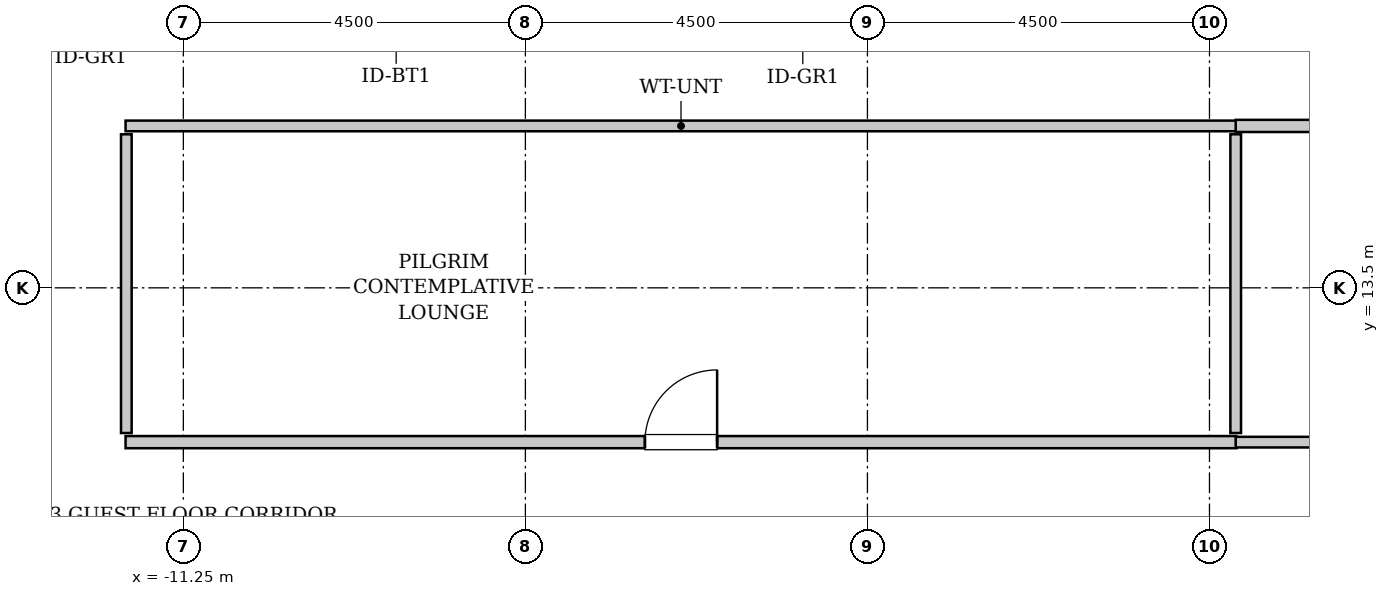
"""IFC4 building model, lengths in metres.
Left out: names, types, materials, properties, quantities, classifications, styles, units other than length and angle.
Written with IfcOpenShell. Run it as: python <this file> out.ifc"""

import sys

from ifc_helpers import new_model, si_unit, direction, frame, frame_2d, origin, place, context, subcontext, project, spatial, rectangle, extrude, source, transform, mapped, element, fill, save


model = new_model("IFC4")
c1 = context("Model", 3, precision=1e-05, world=origin(), true_north=direction((0.0, 1.0)))
c2 = subcontext(c1, "Body", "Model", "MODEL_VIEW")
j1 = project(units=[si_unit("LENGTHUNIT", "METRE"), si_unit("PLANEANGLEUNIT", "RADIAN")], contexts=[c1])
p1 = place(None, origin())
s1 = spatial("IfcSite", under=j1, at=p1, CompositionType="ELEMENT")
p2 = place(p1, origin())
s2 = spatial("IfcBuilding", under=s1, at=p2, CompositionType="ELEMENT")
p3 = place(p2, frame((0.0, 0.0, 214.2)))
s3 = spatial("IfcBuildingStorey", under=s2, at=p3, CompositionType="ELEMENT", Elevation=214.2)
m1 = source(origin(), c2, "Body", "SweptSolid", [
    extrude(rectangle(XDim=14.615, YDim=0.16, at=frame_2d((7.308, 0.0))), origin(), (0.0, 0.0, 1.0), 3.535),
])
p4 = place(p3, frame((-12.01, 11.47, 0.0), z_axis=(0.0, 0.0, 1.0), x_axis=(1.0, 0.0, 0.0)))
e1 = element("IfcWall", 1, at=p4, inside=s3, PredefinedType="PARTITIONING", context=c2, shape_type="MappedRepresentation", body=[
    mapped(m1, transform((0.0, 0.0, 0.0), x_axis=(1.0, 0.0, 0.0), y_axis=(0.0, 1.0, 0.0), z_axis=(0.0, 0.0, 1.0), scale=1.0)),
])
p5 = place(p4, frame((6.833, 0.0, 0.0)))
e2 = element("IfcOpeningElement", 2, at=p5, cuts=e1, PredefinedType="OPENING", context=c2, shape_type="SweptSolid", body=[
    extrude(rectangle(XDim=0.95, YDim=2.1, at=frame_2d((0.475, 1.05))), frame((0.0, 0.09, 0.0), z_axis=(0.0, -1.0, 0.0), x_axis=(1.0, 0.0, 0.0)), (0.0, 0.0, 1.0), 0.18),
])
m2 = source(origin(), c2, "Body", "SweptSolid", [
    extrude(rectangle(XDim=14.615, YDim=0.14, at=frame_2d((7.308, 0.0))), origin(), (0.0, 0.0, 1.0), 3.535),
])
p6 = place(p3, frame((-12.01, 15.63, 0.0), z_axis=(0.0, 0.0, 1.0), x_axis=(1.0, 0.0, 0.0)))
e3 = element("IfcWall", 3, at=p6, inside=s3, PredefinedType="PARTITIONING", context=c2, shape_type="MappedRepresentation", body=[
    mapped(m2, transform((0.0, 0.0, 0.0), x_axis=(1.0, 0.0, 0.0), y_axis=(0.0, 1.0, 0.0), z_axis=(0.0, 0.0, 1.0), scale=1.0)),
])
m3 = source(origin(), c2, "Body", "SweptSolid", [
    extrude(rectangle(XDim=3.93, YDim=0.14, at=frame_2d((1.965, 0.0))), origin(), (0.0, 0.0, 1.0), 3.535),
])
for number, where, z_axis, x_axis in (
    (4, (-12.0, 11.59, 0.0), (0.0, 0.0, 1.0), (0.0, 1.0, 0.0)),
    (5, (2.595, 11.59, 0.0), (0.0, 0.0, 1.0), (0.0, 1.0, 0.0)),
):
    element("IfcWall", number, at=place(p3, frame(where, z_axis=z_axis, x_axis=x_axis)), inside=s3, PredefinedType="PARTITIONING", context=c2, shape_type="MappedRepresentation", body=[
        mapped(m3, transform((0.0, 0.0, 0.0), x_axis=(1.0, 0.0, 0.0), y_axis=(0.0, 1.0, 0.0), z_axis=(0.0, 0.0, 1.0), scale=1.0)),
    ])
m4 = source(origin(), c2, "Body", "SweptSolid", [
    extrude(rectangle(XDim=5.61, YDim=0.16, at=frame_2d((2.805, 0.0))), origin(), (0.0, 0.0, 1.0), 3.535),
])
p7 = place(p3, frame((2.595, 15.63, 0.0), z_axis=(0.0, 0.0, 1.0), x_axis=(1.0, 0.0, 0.0)))
e6 = element("IfcWall", 6, at=p7, inside=s3, PredefinedType="PARTITIONING", context=c2, shape_type="MappedRepresentation", body=[
    mapped(m4, transform((0.0, 0.0, 0.0), x_axis=(1.0, 0.0, 0.0), y_axis=(0.0, 1.0, 0.0), z_axis=(0.0, 0.0, 1.0), scale=1.0)),
])
p8 = place(p7, frame((2.33, 0.0, 0.0)))
e7 = element("IfcOpeningElement", 7, at=p8, cuts=e6, PredefinedType="OPENING", context=c2, shape_type="SweptSolid", body=[
    extrude(rectangle(XDim=0.95, YDim=2.1, at=frame_2d((0.475, 1.05))), frame((0.0, 0.09, 0.0), z_axis=(0.0, -1.0, 0.0), x_axis=(1.0, 0.0, 0.0)), (0.0, 0.0, 1.0), 0.18),
])
m5 = source(origin(), c2, "Body", "SweptSolid", [
    extrude(rectangle(XDim=5.61, YDim=0.14, at=frame_2d((2.805, 0.0))), origin(), (0.0, 0.0, 1.0), 3.535),
])
p9 = place(p3, frame((2.595, 11.47, 0.0), z_axis=(0.0, 0.0, 1.0), x_axis=(1.0, 0.0, 0.0)))
e8 = element("IfcWall", 8, at=p9, inside=s3, PredefinedType="PARTITIONING", context=c2, shape_type="MappedRepresentation", body=[
    mapped(m5, transform((0.0, 0.0, 0.0), x_axis=(1.0, 0.0, 0.0), y_axis=(0.0, 1.0, 0.0), z_axis=(0.0, 0.0, 1.0), scale=1.0)),
])
m6 = source(origin(), c2, "Body", "SweptSolid", [
    extrude(rectangle(XDim=0.95, YDim=2.1, at=frame_2d((0.475, 1.05))), frame((0.0, 0.025, 0.0), z_axis=(0.0, -1.0, 0.0), x_axis=(1.0, 0.0, 0.0)), (0.0, 0.0, 1.0), 0.05),
])
p10 = place(p5, origin())
e9 = element("IfcDoor", 9, at=p10, inside=s3, OperationType="SINGLE_SWING_RIGHT", PredefinedType="DOOR", context=c2, shape_type="MappedRepresentation", body=[
    mapped(m6, transform((0.0, 0.0, 0.0), x_axis=(1.0, 0.0, 0.0), y_axis=(0.0, 1.0, 0.0), z_axis=(0.0, 0.0, 1.0), scale=1.0)),
])
fill(e2, e9)
save(model, sys.argv[1])
